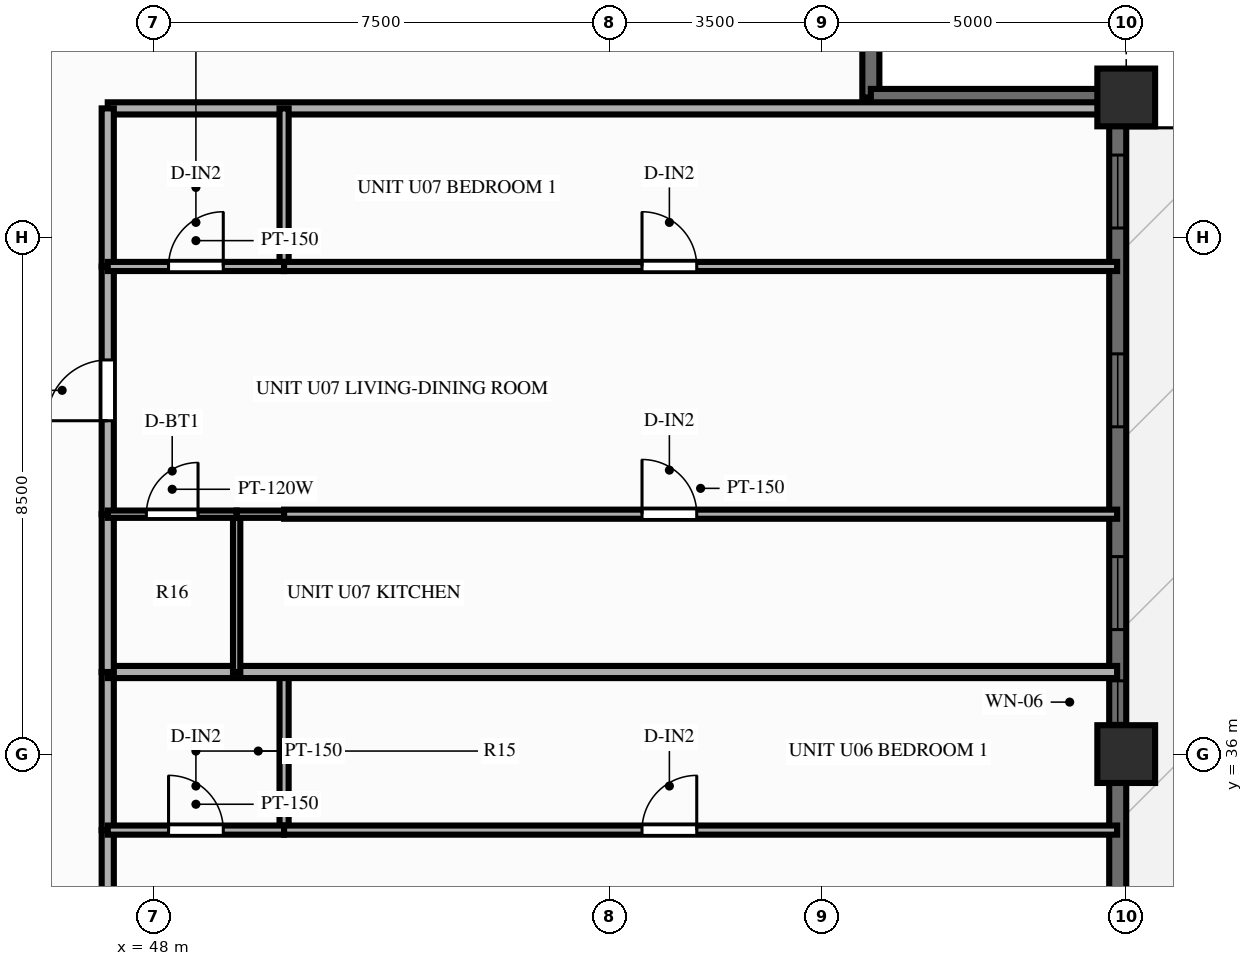
"""IFC4 building model, lengths in metres.
Left out: names, types, materials, properties, quantities, classifications, styles, units other than length and angle.
Written with IfcOpenShell. Run it as: python <this file> out.ifc"""

import sys

from ifc_helpers import new_model, si_unit, direction, frame, frame_2d, origin, origin_2d, place, context, subcontext, project, spatial, rectangle, extrude, source, transform, mapped, element, fill, save


model = new_model("IFC4")
c1 = context("Model", 3, precision=1e-05, world=origin(), true_north=direction((0.0, 1.0)))
c2 = subcontext(c1, "Body", "Model", "MODEL_VIEW")
j1 = project(units=[si_unit("LENGTHUNIT", "METRE"), si_unit("PLANEANGLEUNIT", "RADIAN")], contexts=[c1])
p1 = place(None, origin())
s1 = spatial("IfcSite", under=j1, at=p1, CompositionType="ELEMENT")
p2 = place(p1, origin())
s2 = spatial("IfcBuilding", under=s1, at=p2, CompositionType="ELEMENT")
p3 = place(p2, frame((0.0, 0.0, 101.85)))
s3 = spatial("IfcBuildingStorey", under=s2, at=p3, CompositionType="ELEMENT", Elevation=101.85)
m1 = source(origin(), c2, "Body", "SweptSolid", [
    extrude(rectangle(XDim=0.95, YDim=0.95, at=origin_2d()), origin(), (0.0, 0.0, 1.0), 3.0),
])
for number, where, z_axis, x_axis in (
    (1, (64.0, 36.0, 0.0), (0.0, 0.0, 1.0), (1.0, 0.0, 0.0)),
    (2, (64.0, 46.8, 0.0), (0.0, 0.0, 1.0), (1.0, 0.0, 0.0)),
):
    element("IfcColumn", number, at=place(p3, frame(where, z_axis=z_axis, x_axis=x_axis)), inside=s3, PredefinedType="COLUMN", context=c2, shape_type="MappedRepresentation", body=[
        mapped(m1, transform((0.0, 0.0, 0.0), scale=1.0)),
    ])
p4 = place(p3, frame((63.86, 7.2, 0.0), z_axis=(0.0, 0.0, 1.0), x_axis=(0.0, 1.0, 0.0)))
e3 = element("IfcWall", 3, at=p4, inside=s3, PredefinedType="SOLIDWALL", context=c2, shape_type="SweptSolid", body=[
    extrude(rectangle(XDim=39.6, YDim=0.28, at=frame_2d((19.8, 0.0))), origin(), (0.0, 0.0, 1.0), 2.28),
])
p5 = place(p4, frame((0.945, 0.0, 0.25)))
e4 = element("IfcOpeningElement", 4, at=p5, cuts=e3, PredefinedType="OPENING", context=c2, shape_type="SweptSolid", body=[
    extrude(rectangle(XDim=1.2, YDim=1.5, at=frame_2d((0.6, 0.75))), frame((0.0, 0.152, 0.0), z_axis=(0.0, -1.0, 0.0), x_axis=(1.0, 0.0, 0.0)), (0.0, 0.0, 1.0), 0.304),
])
p6 = place(p4, frame((4.213, 0.0, 0.25)))
e5 = element("IfcOpeningElement", 5, at=p6, cuts=e3, PredefinedType="OPENING", context=c2, shape_type="SweptSolid", body=[
    extrude(rectangle(XDim=1.2, YDim=1.5, at=frame_2d((0.6, 0.75))), frame((0.0, 0.152, 0.0), z_axis=(0.0, -1.0, 0.0), x_axis=(1.0, 0.0, 0.0)), (0.0, 0.0, 1.0), 0.304),
])
p7 = place(p4, frame((7.55, 0.0, 0.25)))
e6 = element("IfcOpeningElement", 6, at=p7, cuts=e3, PredefinedType="OPENING", context=c2, shape_type="SweptSolid", body=[
    extrude(rectangle(XDim=1.2, YDim=1.5, at=frame_2d((0.6, 0.75))), frame((0.0, 0.152, 0.0), z_axis=(0.0, -1.0, 0.0), x_axis=(1.0, 0.0, 0.0)), (0.0, 0.0, 1.0), 0.304),
])
p8 = place(p4, frame((13.483, 0.0, 0.25)))
e7 = element("IfcOpeningElement", 7, at=p8, cuts=e3, PredefinedType="OPENING", context=c2, shape_type="SweptSolid", body=[
    extrude(rectangle(XDim=1.2, YDim=1.5, at=frame_2d((0.6, 0.75))), frame((0.0, 0.152, 0.0), z_axis=(0.0, -1.0, 0.0), x_axis=(1.0, 0.0, 0.0)), (0.0, 0.0, 1.0), 0.304),
])
p9 = place(p4, frame((16.82, 0.0, 0.25)))
e8 = element("IfcOpeningElement", 8, at=p9, cuts=e3, PredefinedType="OPENING", context=c2, shape_type="SweptSolid", body=[
    extrude(rectangle(XDim=1.2, YDim=1.5, at=frame_2d((0.6, 0.75))), frame((0.0, 0.152, 0.0), z_axis=(0.0, -1.0, 0.0), x_axis=(1.0, 0.0, 0.0)), (0.0, 0.0, 1.0), 0.304),
])
p10 = place(p4, frame((19.2, 0.0, 0.25)))
e9 = element("IfcOpeningElement", 9, at=p10, cuts=e3, PredefinedType="OPENING", context=c2, shape_type="SweptSolid", body=[
    extrude(rectangle(XDim=1.2, YDim=1.5, at=frame_2d((0.6, 0.75))), frame((0.0, 0.152, 0.0), z_axis=(0.0, -1.0, 0.0), x_axis=(1.0, 0.0, 0.0)), (0.0, 0.0, 1.0), 0.304),
])
p11 = place(p4, frame((21.578, 0.0, 0.25)))
e10 = element("IfcOpeningElement", 10, at=p11, cuts=e3, PredefinedType="OPENING", context=c2, shape_type="SweptSolid", body=[
    extrude(rectangle(XDim=1.2, YDim=1.5, at=frame_2d((0.6, 0.75))), frame((0.0, 0.152, 0.0), z_axis=(0.0, -1.0, 0.0), x_axis=(1.0, 0.0, 0.0)), (0.0, 0.0, 1.0), 0.304),
])
p12 = place(p4, frame((26.313, 0.0, 0.0), z_axis=(0.0, 0.0, 1.0), x_axis=(-1.0, 0.0, 0.0)))
e11 = element("IfcOpeningElement", 11, at=p12, cuts=e3, PredefinedType="OPENING", context=c2, shape_type="SweptSolid", body=[
    extrude(rectangle(XDim=1.6, YDim=2.15, at=frame_2d((0.8, 1.075))), frame((0.0, 0.152, 0.0), z_axis=(0.0, -1.0, 0.0), x_axis=(1.0, 0.0, 0.0)), (0.0, 0.0, 1.0), 0.304),
])
p13 = place(p4, frame((29.305, 0.0, 0.25)))
e12 = element("IfcOpeningElement", 12, at=p13, cuts=e3, PredefinedType="OPENING", context=c2, shape_type="SweptSolid", body=[
    extrude(rectangle(XDim=0.7, YDim=1.5, at=frame_2d((0.35, 0.75))), frame((0.0, 0.152, 0.0), z_axis=(0.0, -1.0, 0.0), x_axis=(1.0, 0.0, 0.0)), (0.0, 0.0, 1.0), 0.304),
])
p14 = place(p4, frame((30.848, 0.0, 0.25)))
e13 = element("IfcOpeningElement", 13, at=p14, cuts=e3, PredefinedType="OPENING", context=c2, shape_type="SweptSolid", body=[
    extrude(rectangle(XDim=1.2, YDim=1.5, at=frame_2d((0.6, 0.75))), frame((0.0, 0.152, 0.0), z_axis=(0.0, -1.0, 0.0), x_axis=(1.0, 0.0, 0.0)), (0.0, 0.0, 1.0), 0.304),
])
p15 = place(p4, frame((34.183, 0.0, 0.25)))
e14 = element("IfcOpeningElement", 14, at=p15, cuts=e3, PredefinedType="OPENING", context=c2, shape_type="SweptSolid", body=[
    extrude(rectangle(XDim=1.2, YDim=1.5, at=frame_2d((0.6, 0.75))), frame((0.0, 0.152, 0.0), z_axis=(0.0, -1.0, 0.0), x_axis=(1.0, 0.0, 0.0)), (0.0, 0.0, 1.0), 0.304),
])
p16 = place(p4, frame((37.452, 0.0, 0.25)))
e15 = element("IfcOpeningElement", 15, at=p16, cuts=e3, PredefinedType="OPENING", context=c2, shape_type="SweptSolid", body=[
    extrude(rectangle(XDim=1.2, YDim=1.5, at=frame_2d((0.6, 0.75))), frame((0.0, 0.152, 0.0), z_axis=(0.0, -1.0, 0.0), x_axis=(1.0, 0.0, 0.0)), (0.0, 0.0, 1.0), 0.304),
])
for number, where, z_axis, x_axis in (
    (16, (59.8, 46.8, 0.0), (0.0, 0.0, 1.0), (0.0, 1.0, 0.0)),
    (17, (59.8, 46.8, 0.0), (0.0, 0.0, 1.0), (1.0, 0.0, 0.0)),
):
    element("IfcWall", number, at=place(p3, frame(where, z_axis=z_axis, x_axis=x_axis)), inside=s3, PredefinedType="SOLIDWALL", context=c2, shape_type="SweptSolid", body=[
        extrude(rectangle(XDim=4.12, YDim=0.28, at=frame_2d((2.06, 0.0))), origin(), (0.0, 0.0, 1.0), 2.28),
    ])
p17 = place(p3, frame((47.25, 46.62, 0.0), z_axis=(0.0, 0.0, 1.0), x_axis=(1.0, 0.0, 0.0)))
e18 = element("IfcWall", 18, at=p17, inside=s3, PredefinedType="PARTITIONING", context=c2, shape_type="SweptSolid", body=[
    extrude(rectangle(XDim=16.6, YDim=0.2, at=frame_2d((8.3, 0.0))), origin(), (0.0, 0.0, 1.0), 2.79),
])
p18 = place(p3, frame((47.25, 30.676, 0.0), z_axis=(0.0, 0.0, 1.0), x_axis=(0.0, 1.0, 0.0)))
e19 = element("IfcWall", 19, at=p18, inside=s3, PredefinedType="PARTITIONING", context=c2, shape_type="SweptSolid", body=[
    extrude(rectangle(XDim=4.074, YDim=0.2, at=frame_2d((2.037, 0.0))), origin(), (0.0, 0.0, 1.0), 2.79),
])
p19 = place(p18, frame((1.537, 0.0, 0.0)))
e20 = element("IfcOpeningElement", 20, at=p19, cuts=e19, PredefinedType="OPENING", context=c2, shape_type="SweptSolid", body=[
    extrude(rectangle(XDim=1.0, YDim=2.15, at=frame_2d((0.5, 1.075))), frame((0.0, 0.112, 0.0), z_axis=(0.0, -1.0, 0.0), x_axis=(1.0, 0.0, 0.0)), (0.0, 0.0, 1.0), 0.224),
])
p20 = place(p3, frame((47.25, 34.75, 0.0), z_axis=(0.0, 0.0, 1.0), x_axis=(0.0, 1.0, 0.0)))
e21 = element("IfcWall", 21, at=p20, inside=s3, PredefinedType="PARTITIONING", context=c2, shape_type="SweptSolid", body=[
    extrude(rectangle(XDim=2.6, YDim=0.2, at=frame_2d((1.3, 0.0))), origin(), (0.0, 0.0, 1.0), 2.79),
])
p21 = place(p3, frame((50.15, 34.75, 0.0), z_axis=(0.0, 0.0, 1.0), x_axis=(0.0, 1.0, 0.0)))
e22 = element("IfcWall", 22, at=p21, inside=s3, PredefinedType="PARTITIONING", context=c2, shape_type="SweptSolid", body=[
    extrude(rectangle(XDim=2.6, YDim=0.15, at=frame_2d((1.3, 0.0))), origin(), (0.0, 0.0, 1.0), 2.79),
])
p22 = place(p3, frame((47.25, 34.75, 0.0), z_axis=(0.0, 0.0, 1.0), x_axis=(1.0, 0.0, 0.0)))
e23 = element("IfcWall", 23, at=p22, inside=s3, PredefinedType="PARTITIONING", context=c2, shape_type="SweptSolid", body=[
    extrude(rectangle(XDim=2.9, YDim=0.15, at=frame_2d((1.45, 0.0))), origin(), (0.0, 0.0, 1.0), 2.79),
])
p23 = place(p22, frame((1.0, 0.0, 0.0)))
e24 = element("IfcOpeningElement", 24, at=p23, cuts=e23, PredefinedType="OPENING", context=c2, shape_type="SweptSolid", body=[
    extrude(rectangle(XDim=0.9, YDim=2.1, at=frame_2d((0.45, 1.05))), frame((0.0, 0.087, 0.0), z_axis=(0.0, -1.0, 0.0), x_axis=(1.0, 0.0, 0.0)), (0.0, 0.0, 1.0), 0.174),
])
p24 = place(p3, frame((50.15, 34.75, 0.0), z_axis=(0.0, 0.0, 1.0), x_axis=(1.0, 0.0, 0.0)))
e25 = element("IfcWall", 25, at=p24, inside=s3, PredefinedType="PARTITIONING", context=c2, shape_type="SweptSolid", body=[
    extrude(rectangle(XDim=13.7, YDim=0.15, at=frame_2d((6.85, 0.0))), origin(), (0.0, 0.0, 1.0), 2.79),
])
p25 = place(p24, frame((5.887, 0.0, 0.0)))
e26 = element("IfcOpeningElement", 26, at=p25, cuts=e25, PredefinedType="OPENING", context=c2, shape_type="SweptSolid", body=[
    extrude(rectangle(XDim=0.9, YDim=2.1, at=frame_2d((0.45, 1.05))), frame((0.0, 0.087, 0.0), z_axis=(0.0, -1.0, 0.0), x_axis=(1.0, 0.0, 0.0)), (0.0, 0.0, 1.0), 0.174),
])
p26 = place(p3, frame((47.25, 37.35, 0.0), z_axis=(0.0, 0.0, 1.0), x_axis=(1.0, 0.0, 0.0)))
e27 = element("IfcWall", 27, at=p26, inside=s3, PredefinedType="PARTITIONING", context=c2, shape_type="SweptSolid", body=[
    extrude(rectangle(XDim=16.6, YDim=0.2, at=frame_2d((8.3, 0.0))), origin(), (0.0, 0.0, 1.0), 2.79),
])
p27 = place(p3, frame((47.25, 37.35, 0.0), z_axis=(0.0, 0.0, 1.0), x_axis=(0.0, 1.0, 0.0)))
e28 = element("IfcWall", 28, at=p27, inside=s3, PredefinedType="PARTITIONING", context=c2, shape_type="SweptSolid", body=[
    extrude(rectangle(XDim=2.595, YDim=0.2, at=frame_2d((1.298, 0.0))), origin(), (0.0, 0.0, 1.0), 2.79),
])
p28 = place(p3, frame((47.25, 39.946, 0.0), z_axis=(0.0, 0.0, 1.0), x_axis=(0.0, 1.0, 0.0)))
e29 = element("IfcWall", 29, at=p28, inside=s3, PredefinedType="PARTITIONING", context=c2, shape_type="SweptSolid", body=[
    extrude(rectangle(XDim=4.074, YDim=0.2, at=frame_2d((2.037, 0.0))), origin(), (0.0, 0.0, 1.0), 2.79),
])
p29 = place(p28, frame((1.537, 0.0, 0.0)))
e30 = element("IfcOpeningElement", 30, at=p29, cuts=e29, PredefinedType="OPENING", context=c2, shape_type="SweptSolid", body=[
    extrude(rectangle(XDim=1.0, YDim=2.15, at=frame_2d((0.5, 1.075))), frame((0.0, 0.112, 0.0), z_axis=(0.0, -1.0, 0.0), x_axis=(1.0, 0.0, 0.0)), (0.0, 0.0, 1.0), 0.224),
])
p30 = place(p3, frame((47.25, 44.02, 0.0), z_axis=(0.0, 0.0, 1.0), x_axis=(0.0, 1.0, 0.0)))
e31 = element("IfcWall", 31, at=p30, inside=s3, PredefinedType="PARTITIONING", context=c2, shape_type="SweptSolid", body=[
    extrude(rectangle(XDim=2.6, YDim=0.2, at=frame_2d((1.3, 0.0))), origin(), (0.0, 0.0, 1.0), 2.79),
])
p31 = place(p3, frame((49.37, 37.35, 0.0), z_axis=(0.0, 0.0, 1.0), x_axis=(0.0, 1.0, 0.0)))
e32 = element("IfcWall", 32, at=p31, inside=s3, PredefinedType="PARTITIONING", context=c2, shape_type="SweptSolid", body=[
    extrude(rectangle(XDim=2.595, YDim=0.12, at=frame_2d((1.298, 0.0))), origin(), (0.0, 0.0, 1.0), 2.79),
])
p32 = place(p3, frame((50.15, 44.02, 0.0), z_axis=(0.0, 0.0, 1.0), x_axis=(0.0, 1.0, 0.0)))
e33 = element("IfcWall", 33, at=p32, inside=s3, PredefinedType="PARTITIONING", context=c2, shape_type="SweptSolid", body=[
    extrude(rectangle(XDim=2.6, YDim=0.15, at=frame_2d((1.3, 0.0))), origin(), (0.0, 0.0, 1.0), 2.79),
])
p33 = place(p3, frame((47.25, 39.946, 0.0), z_axis=(0.0, 0.0, 1.0), x_axis=(1.0, 0.0, 0.0)))
e34 = element("IfcWall", 34, at=p33, inside=s3, PredefinedType="PARTITIONING", context=c2, shape_type="SweptSolid", body=[
    extrude(rectangle(XDim=2.12, YDim=0.12, at=frame_2d((1.06, 0.0))), origin(), (0.0, 0.0, 1.0), 2.79),
])
p34 = place(p33, frame((0.635, 0.0, 0.0)))
e35 = element("IfcOpeningElement", 35, at=p34, cuts=e34, PredefinedType="OPENING", context=c2, shape_type="SweptSolid", body=[
    extrude(rectangle(XDim=0.85, YDim=2.05, at=frame_2d((0.425, 1.025))), frame((0.0, 0.072, 0.0), z_axis=(0.0, -1.0, 0.0), x_axis=(1.0, 0.0, 0.0)), (0.0, 0.0, 1.0), 0.144),
])
p35 = place(p3, frame((49.37, 39.946, 0.0), z_axis=(0.0, 0.0, 1.0), x_axis=(1.0, 0.0, 0.0)))
e36 = element("IfcWall", 36, at=p35, inside=s3, PredefinedType="PARTITIONING", context=c2, shape_type="SweptSolid", body=[
    extrude(rectangle(XDim=0.78, YDim=0.12, at=frame_2d((0.39, 0.0))), origin(), (0.0, 0.0, 1.0), 2.79),
])
p36 = place(p3, frame((50.15, 39.946, 0.0), z_axis=(0.0, 0.0, 1.0), x_axis=(1.0, 0.0, 0.0)))
e37 = element("IfcWall", 37, at=p36, inside=s3, PredefinedType="PARTITIONING", context=c2, shape_type="SweptSolid", body=[
    extrude(rectangle(XDim=13.7, YDim=0.15, at=frame_2d((6.85, 0.0))), origin(), (0.0, 0.0, 1.0), 2.79),
])
p37 = place(p36, frame((5.887, 0.0, 0.0)))
e38 = element("IfcOpeningElement", 38, at=p37, cuts=e37, PredefinedType="OPENING", context=c2, shape_type="SweptSolid", body=[
    extrude(rectangle(XDim=0.9, YDim=2.1, at=frame_2d((0.45, 1.05))), frame((0.0, 0.087, 0.0), z_axis=(0.0, -1.0, 0.0), x_axis=(1.0, 0.0, 0.0)), (0.0, 0.0, 1.0), 0.174),
])
p38 = place(p3, frame((47.25, 44.02, 0.0), z_axis=(0.0, 0.0, 1.0), x_axis=(1.0, 0.0, 0.0)))
e39 = element("IfcWall", 39, at=p38, inside=s3, PredefinedType="PARTITIONING", context=c2, shape_type="SweptSolid", body=[
    extrude(rectangle(XDim=2.9, YDim=0.15, at=frame_2d((1.45, 0.0))), origin(), (0.0, 0.0, 1.0), 2.79),
])
p39 = place(p38, frame((1.0, 0.0, 0.0)))
e40 = element("IfcOpeningElement", 40, at=p39, cuts=e39, PredefinedType="OPENING", context=c2, shape_type="SweptSolid", body=[
    extrude(rectangle(XDim=0.9, YDim=2.1, at=frame_2d((0.45, 1.05))), frame((0.0, 0.087, 0.0), z_axis=(0.0, -1.0, 0.0), x_axis=(1.0, 0.0, 0.0)), (0.0, 0.0, 1.0), 0.174),
])
p40 = place(p3, frame((50.15, 44.02, 0.0), z_axis=(0.0, 0.0, 1.0), x_axis=(1.0, 0.0, 0.0)))
e41 = element("IfcWall", 41, at=p40, inside=s3, PredefinedType="PARTITIONING", context=c2, shape_type="SweptSolid", body=[
    extrude(rectangle(XDim=13.7, YDim=0.15, at=frame_2d((6.85, 0.0))), origin(), (0.0, 0.0, 1.0), 2.79),
])
p41 = place(p40, frame((5.887, 0.0, 0.0)))
e42 = element("IfcOpeningElement", 42, at=p41, cuts=e41, PredefinedType="OPENING", context=c2, shape_type="SweptSolid", body=[
    extrude(rectangle(XDim=0.9, YDim=2.1, at=frame_2d((0.45, 1.05))), frame((0.0, 0.087, 0.0), z_axis=(0.0, -1.0, 0.0), x_axis=(1.0, 0.0, 0.0)), (0.0, 0.0, 1.0), 0.174),
])
m2 = source(origin(), c2, "Body", "SweptSolid", [
    extrude(rectangle(XDim=0.7, YDim=1.5, at=frame_2d((0.35, 0.75))), frame((0.0, 0.03, 0.0), z_axis=(0.0, -1.0, 0.0), x_axis=(1.0, 0.0, 0.0)), (0.0, 0.0, 1.0), 0.06),
])
p42 = place(p13, origin())
e43 = element("IfcWindow", 43, at=p42, inside=s3, PartitioningType="SINGLE_PANEL", PredefinedType="WINDOW", context=c2, shape_type="MappedRepresentation", body=[
    mapped(m2, transform((0.0, 0.0, 0.0), scale=1.0)),
])
fill(e12, e43)
m3 = source(origin(), c2, "Body", "SweptSolid", [
    extrude(rectangle(XDim=1.2, YDim=1.5, at=frame_2d((0.6, 0.75))), frame((0.0, 0.03, 0.0), z_axis=(0.0, -1.0, 0.0), x_axis=(1.0, 0.0, 0.0)), (0.0, 0.0, 1.0), 0.06),
])
p43 = place(p14, origin())
e44 = element("IfcWindow", 44, at=p43, inside=s3, PartitioningType="SINGLE_PANEL", PredefinedType="WINDOW", context=c2, shape_type="MappedRepresentation", body=[
    mapped(m3, transform((0.0, 0.0, 0.0), scale=1.0)),
])
fill(e13, e44)
p44 = place(p15, origin())
e45 = element("IfcWindow", 45, at=p44, inside=s3, PartitioningType="SINGLE_PANEL", PredefinedType="WINDOW", context=c2, shape_type="MappedRepresentation", body=[
    mapped(m3, transform((0.0, 0.0, 0.0), scale=1.0)),
])
fill(e14, e45)
p45 = place(p16, origin())
e46 = element("IfcWindow", 46, at=p45, inside=s3, PartitioningType="SINGLE_PANEL", PredefinedType="WINDOW", context=c2, shape_type="MappedRepresentation", body=[
    mapped(m3, transform((0.0, 0.0, 0.0), scale=1.0)),
])
fill(e15, e46)
m4 = source(origin(), c2, "Body", "SweptSolid", [
    extrude(rectangle(XDim=0.9, YDim=2.1, at=frame_2d((0.45, 1.05))), frame((0.0, 0.025, 0.0), z_axis=(0.0, -1.0, 0.0), x_axis=(1.0, 0.0, 0.0)), (0.0, 0.0, 1.0), 0.05),
])
p46 = place(p23, origin())
e47 = element("IfcDoor", 47, at=p46, inside=s3, OperationType="SINGLE_SWING_LEFT", PredefinedType="DOOR", context=c2, shape_type="MappedRepresentation", body=[
    mapped(m4, transform((0.0, 0.0, 0.0), scale=1.0)),
])
fill(e24, e47)
p47 = place(p25, origin())
e48 = element("IfcDoor", 48, at=p47, inside=s3, OperationType="SINGLE_SWING_RIGHT", PredefinedType="DOOR", context=c2, shape_type="MappedRepresentation", body=[
    mapped(m4, transform((0.0, 0.0, 0.0), scale=1.0)),
])
fill(e26, e48)
m5 = source(origin(), c2, "Body", "SweptSolid", [
    extrude(rectangle(XDim=1.0, YDim=2.15, at=frame_2d((0.5, 1.075))), frame((0.0, 0.025, 0.0), z_axis=(0.0, -1.0, 0.0), x_axis=(1.0, 0.0, 0.0)), (0.0, 0.0, 1.0), 0.05),
])
p48 = place(p29, origin())
e49 = element("IfcDoor", 49, at=p48, inside=s3, OperationType="SINGLE_SWING_LEFT", PredefinedType="DOOR", context=c2, shape_type="MappedRepresentation", body=[
    mapped(m5, transform((0.0, 0.0, 0.0), scale=1.0)),
])
fill(e30, e49)
m6 = source(origin(), c2, "Body", "SweptSolid", [
    extrude(rectangle(XDim=0.85, YDim=2.05, at=frame_2d((0.425, 1.025))), frame((0.0, 0.025, 0.0), z_axis=(0.0, -1.0, 0.0), x_axis=(1.0, 0.0, 0.0)), (0.0, 0.0, 1.0), 0.05),
])
p49 = place(p34, origin())
e50 = element("IfcDoor", 50, at=p49, inside=s3, OperationType="SINGLE_SWING_RIGHT", PredefinedType="DOOR", context=c2, shape_type="MappedRepresentation", body=[
    mapped(m6, transform((0.0, 0.0, 0.0), scale=1.0)),
])
fill(e35, e50)
p50 = place(p37, origin())
e51 = element("IfcDoor", 51, at=p50, inside=s3, OperationType="SINGLE_SWING_LEFT", PredefinedType="DOOR", context=c2, shape_type="MappedRepresentation", body=[
    mapped(m4, transform((0.0, 0.0, 0.0), scale=1.0)),
])
fill(e38, e51)
p51 = place(p39, origin())
e52 = element("IfcDoor", 52, at=p51, inside=s3, OperationType="SINGLE_SWING_RIGHT", PredefinedType="DOOR", context=c2, shape_type="MappedRepresentation", body=[
    mapped(m4, transform((0.0, 0.0, 0.0), scale=1.0)),
])
fill(e40, e52)
p52 = place(p41, origin())
e53 = element("IfcDoor", 53, at=p52, inside=s3, OperationType="SINGLE_SWING_LEFT", PredefinedType="DOOR", context=c2, shape_type="MappedRepresentation", body=[
    mapped(m4, transform((0.0, 0.0, 0.0), scale=1.0)),
])
fill(e42, e53)
save(model, sys.argv[1])
